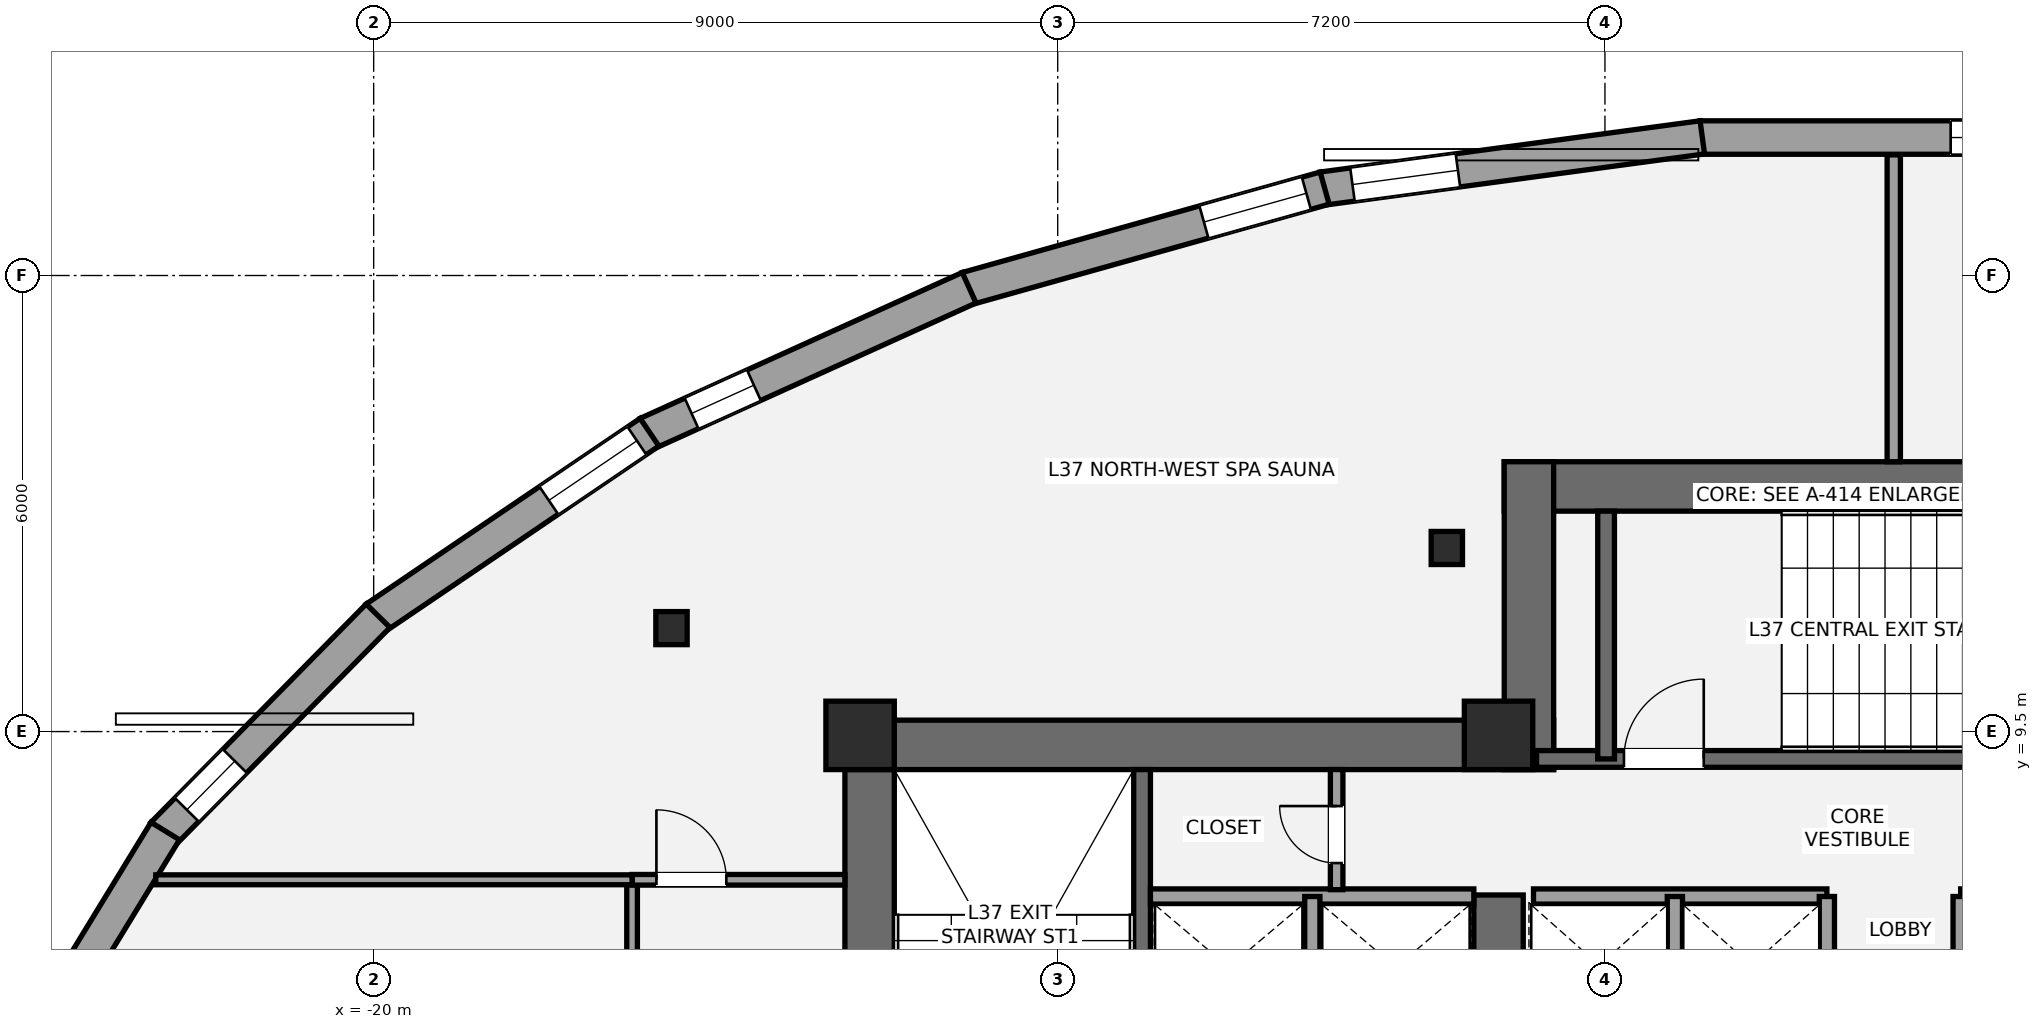
"""IFC4 building model, lengths in metres.
Left out: names, types, materials, properties, quantities, classifications, styles, units other than length and angle.
Written with IfcOpenShell. Run it as: python <this file> out.ifc"""

import sys

from ifc_helpers import new_model, si_unit, direction, frame, frame_2d, origin, origin_2d, place, context, subcontext, project, spatial, rectangle, i_section, extrude, element, fill, save


model = new_model("IFC4")
c1 = context("Model", 3, precision=1e-05, world=origin(), true_north=direction((0.0, 1.0)))
c2 = subcontext(c1, "Body", "Model", "MODEL_VIEW")
j1 = project(units=[si_unit("LENGTHUNIT", "METRE"), si_unit("PLANEANGLEUNIT", "RADIAN")], contexts=[c1])
p1 = place(None, origin())
s1 = spatial("IfcSite", under=j1, at=p1, CompositionType="ELEMENT")
p2 = place(p1, origin())
s2 = spatial("IfcBuilding", under=s1, at=p2, CompositionType="ELEMENT")
p3 = place(p2, frame((0.0, 0.0, 139.6)))
s3 = spatial("IfcBuildingStorey", under=s2, at=p3, CompositionType="ELEMENT", Elevation=139.6)
p4 = place(p3, frame((-13.475, 1.2, 0.0), z_axis=(0.0, 0.0, 1.0), x_axis=(0.0, 1.0, 0.0)))
e1 = element("IfcWall", 1, at=p4, inside=s3, PredefinedType="SHEAR", context=c2, shape_type="SweptSolid", body=[
    extrude(rectangle(XDim=8.45, YDim=0.65, at=frame_2d((4.225, 0.0))), origin(), (0.0, 0.0, 1.0), 4.2),
])
p5 = place(p3, frame((-13.8, 9.325, 0.0), z_axis=(0.0, 0.0, 1.0), x_axis=(1.0, 0.0, 0.0)))
e2 = element("IfcWall", 2, at=p5, inside=s3, PredefinedType="SHEAR", context=c2, shape_type="SweptSolid", body=[
    extrude(rectangle(XDim=9.325, YDim=0.65, at=frame_2d((4.663, 0.0))), origin(), (0.0, 0.0, 1.0), 4.2),
])
p6 = place(p3, frame((-5.2, 5.35, 0.0), z_axis=(0.0, 0.0, 1.0), x_axis=(0.0, 1.0, 0.0)))
e3 = element("IfcWall", 3, at=p6, inside=s3, PredefinedType="SHEAR", context=c2, shape_type="SweptSolid", body=[
    extrude(rectangle(XDim=2.0, YDim=0.65, at=frame_2d((1.0, 0.0))), origin(), (0.0, 0.0, 1.0), 4.2),
])
p7 = place(p3, frame((-9.89, 1.85, 0.0), z_axis=(0.0, 0.0, 1.0), x_axis=(0.0, 1.0, 0.0)))
e4 = element("IfcWall", 4, at=p7, inside=s3, PredefinedType="SHEAR", context=c2, shape_type="SweptSolid", body=[
    extrude(rectangle(XDim=7.15, YDim=0.22, at=frame_2d((3.575, 0.0))), origin(), (0.0, 0.0, 1.0), 4.2),
])
p8 = place(p3, frame((-5.125, 12.725, 0.0), z_axis=(0.0, 0.0, 1.0), x_axis=(1.0, 0.0, 0.0)))
e5 = element("IfcWall", 5, at=p8, inside=s3, PredefinedType="SHEAR", context=c2, shape_type="SweptSolid", body=[
    extrude(rectangle(XDim=10.25, YDim=0.65, at=frame_2d((5.125, 0.0))), origin(), (0.0, 0.0, 1.0), 4.2),
])
p9 = place(p3, frame((-4.8, 9.0, 0.0), z_axis=(0.0, 0.0, 1.0), x_axis=(0.0, 1.0, 0.0)))
e6 = element("IfcWall", 6, at=p9, inside=s3, PredefinedType="SHEAR", context=c2, shape_type="SweptSolid", body=[
    extrude(rectangle(XDim=4.05, YDim=0.65, at=frame_2d((2.025, 0.0))), origin(), (0.0, 0.0, 1.0), 4.2),
])
p10 = place(p3, frame((-4.7, 9.14, 0.0), z_axis=(0.0, 0.0, 1.0), x_axis=(1.0, 0.0, 0.0)))
e7 = element("IfcWall", 7, at=p10, inside=s3, PredefinedType="SHEAR", context=c2, shape_type="SweptSolid", body=[
    extrude(rectangle(XDim=9.3, YDim=0.22, at=frame_2d((4.65, 0.0))), origin(), (0.0, 0.0, 1.0), 4.2),
])
p11 = place(p10, frame((1.15, 0.0, 0.0)))
e8 = element("IfcOpeningElement", 8, at=p11, cuts=e7, PredefinedType="OPENING", context=c2, shape_type="SweptSolid", body=[
    extrude(rectangle(XDim=1.05, YDim=2.15, at=frame_2d((0.525, 1.075))), frame((0.0, 0.12, 0.0), z_axis=(0.0, -1.0, 0.0), x_axis=(1.0, 0.0, 0.0)), (0.0, 0.0, 1.0), 0.24),
])
p12 = place(p3, frame((-3.785, 9.14, 0.0), z_axis=(0.0, 0.0, 1.0), x_axis=(0.0, 1.0, 0.0)))
e9 = element("IfcWall", 9, at=p12, inside=s3, PredefinedType="SHEAR", context=c2, shape_type="SweptSolid", body=[
    extrude(rectangle(XDim=3.26, YDim=0.22, at=frame_2d((1.63, 0.0))), origin(), (0.0, 0.0, 1.0), 4.2),
])
for number, where, z_axis, x_axis in (
    (10, (-13.6, 9.45, 0.0), (0.0, 0.0, 1.0), (1.0, 0.0, 0.0)),
    (11, (-5.2, 9.45, 0.0), (0.0, 0.0, 1.0), (1.0, 0.0, 0.0)),
):
    element("IfcColumn", number, at=place(p3, frame(where, z_axis=z_axis, x_axis=x_axis)), inside=s3, PredefinedType="COLUMN", context=c2, shape_type="SweptSolid", body=[
        extrude(rectangle(XDim=0.9, YDim=0.9, at=origin_2d()), origin(), (0.0, 0.0, 1.0), 4.2),
    ])
for number, where, z_axis, x_axis in (
    (12, (-5.88, 11.915, 0.0), (0.0, 0.0, 1.0), (1.0, 0.0, 0.0)),
    (13, (-16.082, 10.861, 0.0), (0.0, 0.0, 1.0), (1.0, 0.0, 0.0)),
):
    element("IfcColumn", number, at=place(p3, frame(where, z_axis=z_axis, x_axis=x_axis)), inside=s3, PredefinedType="COLUMN", context=c2, shape_type="SweptSolid", body=[
        extrude(i_section(OverallWidth=0.412, OverallDepth=0.435, WebThickness=0.036, FlangeThickness=0.057, at=origin_2d()), origin(), (0.0, 0.0, 1.0), 4.2),
    ])
p13 = place(p3, frame((-2.548, 17.315, 0.0), z_axis=(0.0, 0.0, 1.0), x_axis=(1.0, 0.0, 0.0)))
e14 = element("IfcWall", 14, at=p13, inside=s3, PredefinedType="STANDARD", context=c2, shape_type="SweptSolid", body=[
    extrude(rectangle(XDim=5.097, YDim=0.44, at=frame_2d((2.548, 0.0))), origin(), (0.0, 0.0, 1.0), 3.242),
])
p14 = place(p13, frame((3.297, 0.0, 0.58)))
e15 = element("IfcOpeningElement", 15, at=p14, cuts=e14, PredefinedType="OPENING", context=c2, shape_type="SweptSolid", body=[
    extrude(rectangle(XDim=1.4, YDim=1.55, at=frame_2d((0.7, 0.775))), frame((0.0, 0.23, 0.0), z_axis=(0.0, -1.0, 0.0), x_axis=(1.0, 0.0, 0.0)), (0.0, 0.0, 1.0), 0.46),
])
p15 = place(p3, frame((-7.518, 16.643, 0.0), z_axis=(0.0, 0.0, 1.0), x_axis=(0.99103751038, 0.133583880086, 0.0)))
e16 = element("IfcWall", 16, at=p15, inside=s3, PredefinedType="STANDARD", context=c2, shape_type="SweptSolid", body=[
    extrude(rectangle(XDim=5.044, YDim=0.44, at=frame_2d((2.522, 0.0))), origin(), (0.0, 0.0, 1.0), 3.238),
])
p16 = place(p15, frame((0.4, 0.0, 0.58)))
e17 = element("IfcOpeningElement", 17, at=p16, cuts=e16, PredefinedType="OPENING", context=c2, shape_type="SweptSolid", body=[
    extrude(rectangle(XDim=1.4, YDim=1.55, at=frame_2d((0.7, 0.775))), frame((0.0, 0.23, 0.0), z_axis=(0.0, -1.0, 0.0), x_axis=(1.0, 0.0, 0.0)), (0.0, 0.0, 1.0), 0.46),
])
p17 = place(p3, frame((-12.197, 15.328, 0.0), z_axis=(0.0, 0.0, 1.0), x_axis=(0.962790668442, 0.270248272446, 0.0)))
e18 = element("IfcWall", 18, at=p17, inside=s3, PredefinedType="STANDARD", context=c2, shape_type="SweptSolid", body=[
    extrude(rectangle(XDim=4.891, YDim=0.44, at=frame_2d((2.445, 0.0))), origin(), (0.0, 0.0, 1.0), 3.238),
])
p18 = place(p17, frame((3.241, 0.0, 0.58)))
e19 = element("IfcOpeningElement", 19, at=p18, cuts=e18, PredefinedType="OPENING", context=c2, shape_type="SweptSolid", body=[
    extrude(rectangle(XDim=1.4, YDim=1.55, at=frame_2d((0.7, 0.775))), frame((0.0, 0.23, 0.0), z_axis=(0.0, -1.0, 0.0), x_axis=(1.0, 0.0, 0.0)), (0.0, 0.0, 1.0), 0.46),
])
p19 = place(p3, frame((-16.403, 13.42, 0.0), z_axis=(0.0, 0.0, 1.0), x_axis=(0.910938924115, 0.412541242221, 0.0)))
e20 = element("IfcWall", 20, at=p19, inside=s3, PredefinedType="STANDARD", context=c2, shape_type="SweptSolid", body=[
    extrude(rectangle(XDim=4.652, YDim=0.44, at=frame_2d((2.326, 0.0))), origin(), (0.0, 0.0, 1.0), 3.238),
])
p20 = place(p19, frame((0.644, 0.0, 0.58)))
e21 = element("IfcOpeningElement", 21, at=p20, cuts=e20, PredefinedType="OPENING", context=c2, shape_type="SweptSolid", body=[
    extrude(rectangle(XDim=0.9, YDim=1.35, at=frame_2d((0.45, 0.675))), frame((0.0, 0.23, 0.0), z_axis=(0.0, -1.0, 0.0), x_axis=(1.0, 0.0, 0.0)), (0.0, 0.0, 1.0), 0.46),
])
p21 = place(p3, frame((-19.975, 10.996, 0.0), z_axis=(0.0, 0.0, 1.0), x_axis=(0.827816201219, 0.56099940909, 0.0)))
e22 = element("IfcWall", 22, at=p21, inside=s3, PredefinedType="STANDARD", context=c2, shape_type="SweptSolid", body=[
    extrude(rectangle(XDim=4.354, YDim=0.44, at=frame_2d((2.177, 0.0))), origin(), (0.0, 0.0, 1.0), 3.242),
])
p22 = place(p21, frame((2.754, 0.0, 0.45)))
e23 = element("IfcOpeningElement", 23, at=p22, cuts=e22, PredefinedType="OPENING", context=c2, shape_type="SweptSolid", body=[
    extrude(rectangle(XDim=1.4, YDim=1.55, at=frame_2d((0.7, 0.775))), frame((0.0, 0.23, 0.0), z_axis=(0.0, -1.0, 0.0), x_axis=(1.0, 0.0, 0.0)), (0.0, 0.0, 1.0), 0.46),
])
p23 = place(p3, frame((-22.773, 8.152, 0.0), z_axis=(0.0, 0.0, 1.0), x_axis=(0.702094935552, 0.712083352897, 0.0)))
e24 = element("IfcWall", 24, at=p23, inside=s3, PredefinedType="STANDARD", context=c2, shape_type="SweptSolid", body=[
    extrude(rectangle(XDim=4.033, YDim=0.44, at=frame_2d((2.017, 0.0))), origin(), (0.0, 0.0, 1.0), 3.238),
])
p24 = place(p23, frame((0.448, 0.0, 0.58)))
e25 = element("IfcOpeningElement", 25, at=p24, cuts=e24, PredefinedType="OPENING", context=c2, shape_type="SweptSolid", body=[
    extrude(rectangle(XDim=0.9, YDim=1.35, at=frame_2d((0.45, 0.675))), frame((0.0, 0.23, 0.0), z_axis=(0.0, -1.0, 0.0), x_axis=(1.0, 0.0, 0.0)), (0.0, 0.0, 1.0), 0.46),
])
p25 = place(p3, frame((-24.693, 5.0, 0.0), z_axis=(0.0, 0.0, 1.0), x_axis=(0.521476412293, 0.853265698022, 0.0)))
e26 = element("IfcWall", 26, at=p25, inside=s3, PredefinedType="STANDARD", context=c2, shape_type="SweptSolid", body=[
    extrude(rectangle(XDim=3.74, YDim=0.44, at=frame_2d((1.87, 0.0))), origin(), (0.0, 0.0, 1.0), 3.238),
])
p26 = place(p3, frame((-9.78, 7.33, 0.0), z_axis=(0.0, 0.0, 1.0), x_axis=(1.0, 0.0, 0.0)))
e27 = element("IfcWall", 27, at=p26, inside=s3, PredefinedType="SOLIDWALL", context=c2, shape_type="SweptSolid", body=[
    extrude(rectangle(XDim=4.255, YDim=0.2, at=frame_2d((2.127, 0.0))), origin(), (0.0, 0.0, 1.0), 4.02),
])
p27 = place(p3, frame((-7.65, 5.47, 0.0), z_axis=(0.0, 0.0, 1.0), x_axis=(0.0, 1.0, 0.0)))
e28 = element("IfcWall", 28, at=p27, inside=s3, PredefinedType="SOLIDWALL", context=c2, shape_type="SweptSolid", body=[
    extrude(rectangle(XDim=1.86, YDim=0.2, at=frame_2d((0.93, 0.0))), origin(), (0.0, 0.0, 1.0), 4.02),
])
for number, where, z_axis, x_axis in (
    (29, (-4.74, 7.33, 0.0), (0.0, 0.0, 1.0), (1.0, 0.0, 0.0)),
    (30, (0.88, 7.33, 0.0), (0.0, 0.0, 1.0), (1.0, 0.0, 0.0)),
):
    element("IfcWall", number, at=place(p3, frame(where, z_axis=z_axis, x_axis=x_axis)), inside=s3, PredefinedType="SOLIDWALL", context=c2, shape_type="SweptSolid", body=[
        extrude(rectangle(XDim=3.86, YDim=0.2, at=frame_2d((1.93, 0.0))), origin(), (0.0, 0.0, 1.0), 4.02),
    ])
for number, where, z_axis, x_axis in (
    (31, (-2.88, 5.52, 0.0), (0.0, 0.0, 1.0), (0.0, 1.0, 0.0)),
    (32, (-0.88, 5.52, 0.0), (0.0, 0.0, 1.0), (0.0, 1.0, 0.0)),
    (33, (0.88, 5.52, 0.0), (0.0, 0.0, 1.0), (0.0, 1.0, 0.0)),
):
    element("IfcWall", number, at=place(p3, frame(where, z_axis=z_axis, x_axis=x_axis)), inside=s3, PredefinedType="SOLIDWALL", context=c2, shape_type="SweptSolid", body=[
        extrude(rectangle(XDim=1.81, YDim=0.2, at=frame_2d((0.905, 0.0))), origin(), (0.0, 0.0, 1.0), 4.02),
    ])
p28 = place(p3, frame((-7.33, 7.42, 0.0), z_axis=(0.0, 0.0, 1.0), x_axis=(0.0, 1.0, 0.0)))
e34 = element("IfcWall", 34, at=p28, inside=s3, PredefinedType="PARTITIONING", context=c2, shape_type="SweptSolid", body=[
    extrude(rectangle(XDim=1.58, YDim=0.165, at=frame_2d((0.79, 0.0))), origin(), (0.0, 0.0, 1.0), 4.02),
])
p29 = place(p28, frame((0.35, 0.0, 0.0)))
e35 = element("IfcOpeningElement", 35, at=p29, cuts=e34, PredefinedType="OPENING", context=c2, shape_type="SweptSolid", body=[
    extrude(rectangle(XDim=0.75, YDim=2.1, at=frame_2d((0.375, 1.05))), frame((0.0, 0.093, 0.0), z_axis=(0.0, -1.0, 0.0), x_axis=(1.0, 0.0, 0.0)), (0.0, 0.0, 1.0), 0.185),
])
p30 = place(p3, frame((-16.6, -13.008, 0.0), z_axis=(0.0, 0.0, 1.0), x_axis=(0.0, 1.0, 0.0)))
e36 = element("IfcWall", 36, at=p30, inside=s3, PredefinedType="PARTITIONING", context=c2, shape_type="SweptSolid", body=[
    extrude(rectangle(XDim=20.558, YDim=0.14, at=frame_2d((10.279, 0.0))), origin(), (0.0, 0.0, 1.0), 3.398),
])
p31 = place(p30, frame((10.508, 0.0, 0.0)))
e37 = element("IfcOpeningElement", 37, at=p31, cuts=e36, PredefinedType="OPENING", context=c2, shape_type="SweptSolid", body=[
    extrude(rectangle(XDim=0.9, YDim=2.1, at=frame_2d((0.45, 1.05))), frame((0.0, 0.08, 0.0), z_axis=(0.0, -1.0, 0.0), x_axis=(1.0, 0.0, 0.0)), (0.0, 0.0, 1.0), 0.16),
])
p32 = place(p30, frame((17.433, 0.0, 0.0)))
e38 = element("IfcOpeningElement", 38, at=p32, cuts=e36, PredefinedType="OPENING", context=c2, shape_type="SweptSolid", body=[
    extrude(rectangle(XDim=0.9, YDim=2.1, at=frame_2d((0.45, 1.05))), frame((0.0, 0.08, 0.0), z_axis=(0.0, -1.0, 0.0), x_axis=(1.0, 0.0, 0.0)), (0.0, 0.0, 1.0), 0.16),
])
p33 = place(p3, frame((-16.6, 7.55, 0.0), z_axis=(0.0, 0.0, 1.0), x_axis=(1.0, 0.0, 0.0)))
e39 = element("IfcWall", 39, at=p33, inside=s3, PredefinedType="PARTITIONING", context=c2, shape_type="SweptSolid", body=[
    extrude(rectangle(XDim=2.8, YDim=0.14, at=frame_2d((1.4, 0.0))), origin(), (0.0, 0.0, 1.0), 3.473),
])
p34 = place(p33, frame((0.32, 0.0, 0.0)))
e40 = element("IfcOpeningElement", 40, at=p34, cuts=e39, PredefinedType="OPENING", context=c2, shape_type="SweptSolid", body=[
    extrude(rectangle(XDim=0.92, YDim=2.15, at=frame_2d((0.46, 1.075))), frame((0.0, 0.08, 0.0), z_axis=(0.0, -1.0, 0.0), x_axis=(1.0, 0.0, 0.0)), (0.0, 0.0, 1.0), 0.16),
])
p35 = place(p3, frame((0.0, 13.05, 0.0), z_axis=(0.0, 0.0, 1.0), x_axis=(0.0, 1.0, 0.0)))
e41 = element("IfcWall", 41, at=p35, inside=s3, PredefinedType="PARTITIONING", context=c2, shape_type="SweptSolid", body=[
    extrude(rectangle(XDim=4.037, YDim=0.175, at=frame_2d((2.019, 0.0))), origin(), (0.0, 0.0, 1.0), 4.02),
])
p36 = place(p3, frame((-22.867, 7.55, 0.0), z_axis=(0.0, 0.0, 1.0), x_axis=(1.0, 0.0, 0.0)))
e42 = element("IfcWall", 42, at=p36, inside=s3, PredefinedType="PARTITIONING", context=c2, shape_type="SweptSolid", body=[
    extrude(rectangle(XDim=6.267, YDim=0.13, at=frame_2d((3.133, 0.0))), origin(), (0.0, 0.0, 1.0), 3.473),
])
p37 = place(p14, origin())
e43 = element("IfcWindow", 43, at=p37, inside=s3, PartitioningType="SINGLE_PANEL", PredefinedType="WINDOW", context=c2, shape_type="SweptSolid", body=[
    extrude(rectangle(XDim=1.4, YDim=1.55, at=frame_2d((0.7, 0.775))), frame((0.0, -0.01, 0.0), z_axis=(0.0, -1.0, 0.0), x_axis=(1.0, 0.0, 0.0)), (0.0, 0.0, 1.0), 0.06),
])
fill(e15, e43)
p38 = place(p16, origin())
e44 = element("IfcWindow", 44, at=p38, inside=s3, PartitioningType="SINGLE_PANEL", PredefinedType="WINDOW", context=c2, shape_type="SweptSolid", body=[
    extrude(rectangle(XDim=1.4, YDim=1.55, at=frame_2d((0.7, 0.775))), frame((0.0, -0.01, 0.0), z_axis=(0.0, -1.0, 0.0), x_axis=(1.0, 0.0, 0.0)), (0.0, 0.0, 1.0), 0.06),
])
fill(e17, e44)
p39 = place(p18, origin())
e45 = element("IfcWindow", 45, at=p39, inside=s3, PartitioningType="SINGLE_PANEL", PredefinedType="WINDOW", context=c2, shape_type="SweptSolid", body=[
    extrude(rectangle(XDim=1.4, YDim=1.55, at=frame_2d((0.7, 0.775))), frame((0.0, -0.01, 0.0), z_axis=(0.0, -1.0, 0.0), x_axis=(1.0, 0.0, 0.0)), (0.0, 0.0, 1.0), 0.06),
])
fill(e19, e45)
p40 = place(p20, origin())
e46 = element("IfcWindow", 46, at=p40, inside=s3, PartitioningType="SINGLE_PANEL", PredefinedType="WINDOW", context=c2, shape_type="SweptSolid", body=[
    extrude(rectangle(XDim=0.9, YDim=1.35, at=frame_2d((0.45, 0.675))), frame((0.0, -0.01, 0.0), z_axis=(0.0, -1.0, 0.0), x_axis=(1.0, 0.0, 0.0)), (0.0, 0.0, 1.0), 0.06),
])
fill(e21, e46)
p41 = place(p22, origin())
e47 = element("IfcWindow", 47, at=p41, inside=s3, PartitioningType="SINGLE_PANEL", PredefinedType="WINDOW", context=c2, shape_type="SweptSolid", body=[
    extrude(rectangle(XDim=1.4, YDim=1.55, at=frame_2d((0.7, 0.775))), frame((0.0, -0.01, 0.0), z_axis=(0.0, -1.0, 0.0), x_axis=(1.0, 0.0, 0.0)), (0.0, 0.0, 1.0), 0.06),
])
fill(e23, e47)
p42 = place(p24, origin())
e48 = element("IfcWindow", 48, at=p42, inside=s3, PartitioningType="SINGLE_PANEL", PredefinedType="WINDOW", context=c2, shape_type="SweptSolid", body=[
    extrude(rectangle(XDim=0.9, YDim=1.35, at=frame_2d((0.45, 0.675))), frame((0.0, -0.01, 0.0), z_axis=(0.0, -1.0, 0.0), x_axis=(1.0, 0.0, 0.0)), (0.0, 0.0, 1.0), 0.06),
])
fill(e25, e48)
p43 = place(p11, origin())
e49 = element("IfcDoor", 49, at=p43, inside=s3, OperationType="SINGLE_SWING_RIGHT", PredefinedType="DOOR", context=c2, shape_type="SweptSolid", body=[
    extrude(rectangle(XDim=1.05, YDim=2.15, at=frame_2d((0.525, 1.075))), frame((0.0, 0.025, 0.0), z_axis=(0.0, -1.0, 0.0), x_axis=(1.0, 0.0, 0.0)), (0.0, 0.0, 1.0), 0.05),
])
fill(e8, e49)
p44 = place(p29, origin())
e50 = element("IfcDoor", 50, at=p44, inside=s3, OperationType="SINGLE_SWING_RIGHT", PredefinedType="DOOR", context=c2, shape_type="SweptSolid", body=[
    extrude(rectangle(XDim=0.75, YDim=2.1, at=frame_2d((0.375, 1.05))), frame((0.0, 0.025, 0.0), z_axis=(0.0, -1.0, 0.0), x_axis=(1.0, 0.0, 0.0)), (0.0, 0.0, 1.0), 0.05),
])
fill(e35, e50)
p45 = place(p34, origin())
e51 = element("IfcDoor", 51, at=p45, inside=s3, OperationType="SINGLE_SWING_LEFT", PredefinedType="DOOR", context=c2, shape_type="SweptSolid", body=[
    extrude(rectangle(XDim=0.92, YDim=2.15, at=frame_2d((0.46, 1.075))), frame((0.0, 0.025, 0.0), z_axis=(0.0, -1.0, 0.0), x_axis=(1.0, 0.0, 0.0)), (0.0, 0.0, 1.0), 0.05),
])
fill(e40, e51)
save(model, sys.argv[1])
